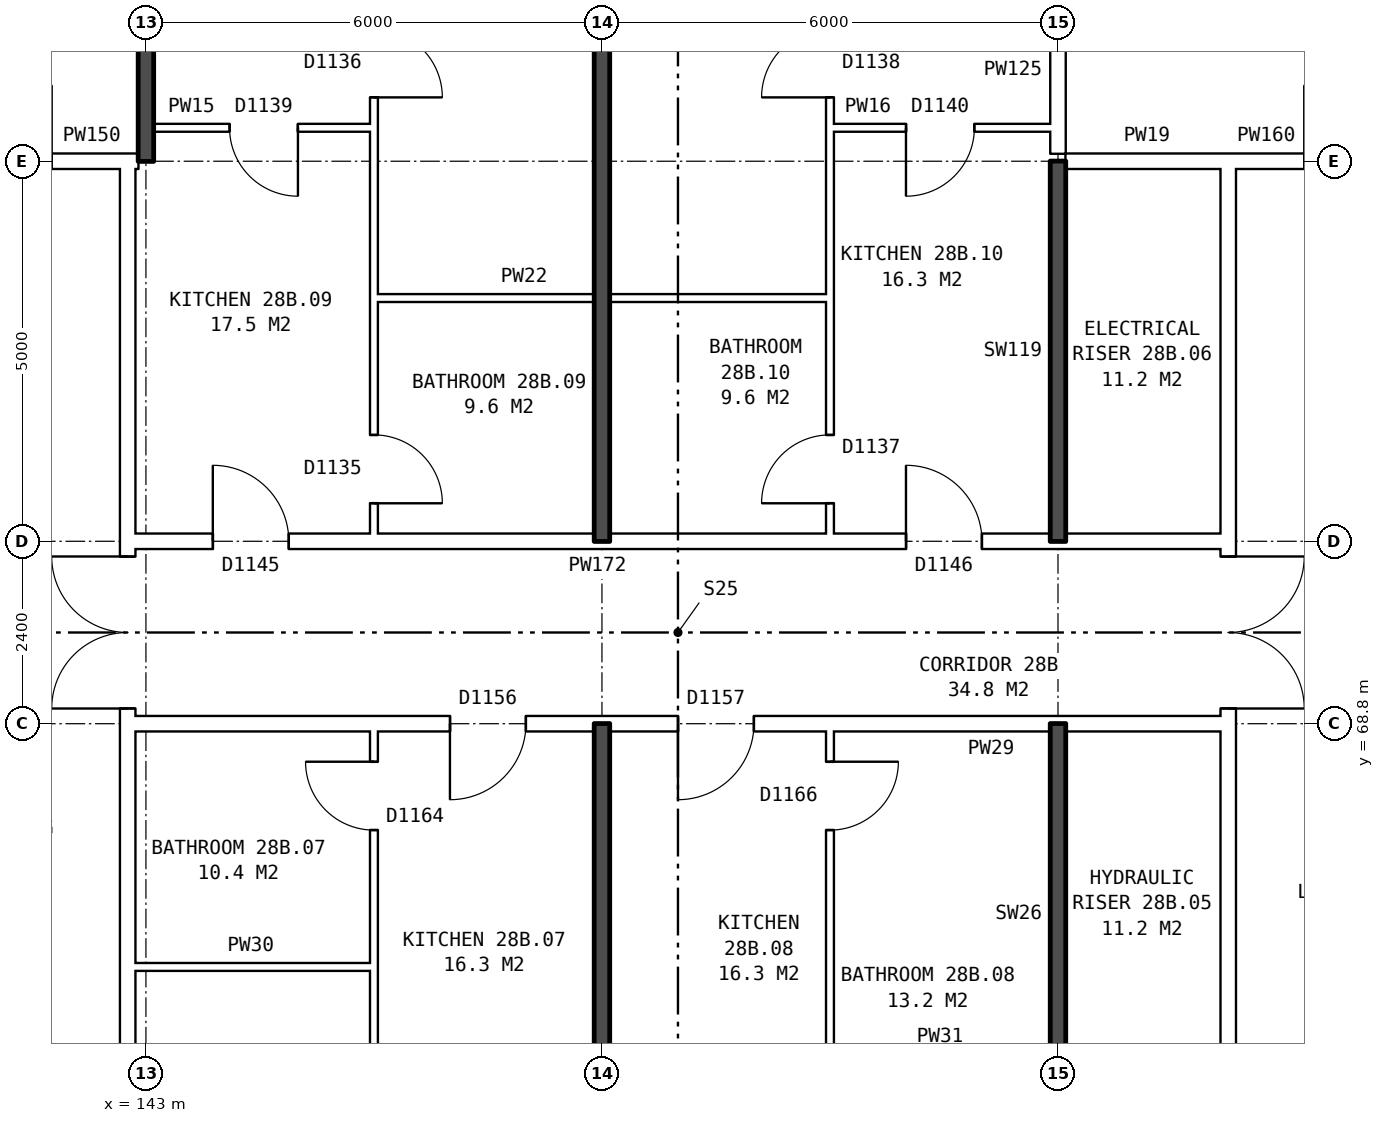
"""IFC4 building model, lengths in metres.
Left out: names, types, materials, properties, quantities, classifications, styles, units other than length and angle.
Written with IfcOpenShell. Run it as: python <this file> out.ifc"""

import sys

from ifc_helpers import new_model, si_unit, direction, frame, frame_2d, origin, place, context, subcontext, project, spatial, rectangle, extrude, element, fill, save


model = new_model("IFC4")
c1 = context("Model", 3, precision=1e-05, world=origin(), true_north=direction((0.0, 1.0)))
c2 = subcontext(c1, "Body", "Model", "MODEL_VIEW")
j1 = project(units=[si_unit("LENGTHUNIT", "METRE"), si_unit("PLANEANGLEUNIT", "RADIAN")], contexts=[c1])
p1 = place(None, origin())
s1 = spatial("IfcSite", under=j1, at=p1, CompositionType="ELEMENT")
p2 = place(p1, origin())
s2 = spatial("IfcBuilding", under=s1, at=p2, CompositionType="ELEMENT")
p3 = place(p2, frame((0.0, 0.0, 102.6)))
s3 = spatial("IfcBuildingStorey", under=s2, at=p3, CompositionType="ELEMENT", Elevation=102.6)
p4 = place(p3, frame((142.76, 63.9, 0.0), z_axis=(0.0, 0.0, 1.0), x_axis=(0.0, 1.0, 0.0)))
e1 = element("IfcWall", 1, at=p4, inside=s3, PredefinedType="PARTITIONING", context=c2, shape_type="SweptSolid", body=[
    extrude(rectangle(XDim=12.2, YDim=0.2, at=frame_2d((6.1, 0.0))), origin(), (0.0, 0.0, 1.0), 2.85),
])
p5 = place(p4, frame((5.1, 0.0, 0.0)))
e2 = element("IfcOpeningElement", 2, at=p5, cuts=e1, PredefinedType="OPENING", context=c2, shape_type="SweptSolid", body=[
    extrude(rectangle(XDim=2.0, YDim=2.1, at=frame_2d((1.0, 1.05))), frame((0.0, 0.11, 0.0), z_axis=(0.0, -1.0, 0.0), x_axis=(1.0, 0.0, 0.0)), (0.0, 0.0, 1.0), 0.22),
])
p6 = place(p3, frame((157.24, 63.9, 0.0), z_axis=(0.0, 0.0, 1.0), x_axis=(0.0, 1.0, 0.0)))
e3 = element("IfcWall", 3, at=p6, inside=s3, PredefinedType="PARTITIONING", context=c2, shape_type="SweptSolid", body=[
    extrude(rectangle(XDim=12.2, YDim=0.2, at=frame_2d((6.1, 0.0))), origin(), (0.0, 0.0, 1.0), 2.85),
])
p7 = place(p6, frame((5.1, 0.0, 0.0)))
e4 = element("IfcOpeningElement", 4, at=p7, cuts=e3, PredefinedType="OPENING", context=c2, shape_type="SweptSolid", body=[
    extrude(rectangle(XDim=2.0, YDim=2.1, at=frame_2d((1.0, 1.05))), frame((0.0, 0.11, 0.0), z_axis=(0.0, -1.0, 0.0), x_axis=(1.0, 0.0, 0.0)), (0.0, 0.0, 1.0), 0.22),
])
p8 = place(p3, frame((142.76, 65.6, 0.0), z_axis=(0.0, 0.0, 1.0), x_axis=(1.0, 0.0, 0.0)))
e5 = element("IfcWall", 5, at=p8, inside=s3, PredefinedType="PARTITIONING", context=c2, shape_type="SweptSolid", body=[
    extrude(rectangle(XDim=3.24, YDim=0.1, at=frame_2d((1.62, 0.0))), origin(), (0.0, 0.0, 1.0), 2.85),
])
p9 = place(p3, frame((142.76, 68.8, 0.0), z_axis=(0.0, 0.0, 1.0), x_axis=(1.0, 0.0, 0.0)))
e6 = element("IfcWall", 6, at=p9, inside=s3, PredefinedType="PARTITIONING", context=c2, shape_type="SweptSolid", body=[
    extrude(rectangle(XDim=14.48, YDim=0.2, at=frame_2d((7.24, 0.0))), origin(), (0.0, 0.0, 1.0), 2.85),
])
p10 = place(p9, frame((4.24, 0.0, 0.0)))
e7 = element("IfcOpeningElement", 7, at=p10, cuts=e6, PredefinedType="OPENING", context=c2, shape_type="SweptSolid", body=[
    extrude(rectangle(XDim=1.0, YDim=2.1, at=frame_2d((0.5, 1.05))), frame((0.0, 0.11, 0.0), z_axis=(0.0, -1.0, 0.0), x_axis=(1.0, 0.0, 0.0)), (0.0, 0.0, 1.0), 0.22),
])
p11 = place(p9, frame((7.24, 0.0, 0.0)))
e8 = element("IfcOpeningElement", 8, at=p11, cuts=e6, PredefinedType="OPENING", context=c2, shape_type="SweptSolid", body=[
    extrude(rectangle(XDim=1.0, YDim=2.1, at=frame_2d((0.5, 1.05))), frame((0.0, 0.11, 0.0), z_axis=(0.0, -1.0, 0.0), x_axis=(1.0, 0.0, 0.0)), (0.0, 0.0, 1.0), 0.22),
])
p12 = place(p3, frame((142.76, 71.2, 0.0), z_axis=(0.0, 0.0, 1.0), x_axis=(1.0, 0.0, 0.0)))
e9 = element("IfcWall", 9, at=p12, inside=s3, PredefinedType="PARTITIONING", context=c2, shape_type="SweptSolid", body=[
    extrude(rectangle(XDim=14.48, YDim=0.2, at=frame_2d((7.24, 0.0))), origin(), (0.0, 0.0, 1.0), 2.85),
])
p13 = place(p12, frame((1.12, 0.0, 0.0)))
e10 = element("IfcOpeningElement", 10, at=p13, cuts=e9, PredefinedType="OPENING", context=c2, shape_type="SweptSolid", body=[
    extrude(rectangle(XDim=1.0, YDim=2.1, at=frame_2d((0.5, 1.05))), frame((0.0, 0.11, 0.0), z_axis=(0.0, -1.0, 0.0), x_axis=(1.0, 0.0, 0.0)), (0.0, 0.0, 1.0), 0.22),
])
p14 = place(p12, frame((10.24, 0.0, 0.0)))
e11 = element("IfcOpeningElement", 11, at=p14, cuts=e9, PredefinedType="OPENING", context=c2, shape_type="SweptSolid", body=[
    extrude(rectangle(XDim=1.0, YDim=2.1, at=frame_2d((0.5, 1.05))), frame((0.0, 0.11, 0.0), z_axis=(0.0, -1.0, 0.0), x_axis=(1.0, 0.0, 0.0)), (0.0, 0.0, 1.0), 0.22),
])
p15 = place(p3, frame((146.0, 74.4, 0.0), z_axis=(0.0, 0.0, 1.0), x_axis=(1.0, 0.0, 0.0)))
e12 = element("IfcWall", 12, at=p15, inside=s3, PredefinedType="PARTITIONING", context=c2, shape_type="SweptSolid", body=[
    extrude(rectangle(XDim=6.0, YDim=0.1, at=frame_2d((3.0, 0.0))), origin(), (0.0, 0.0, 1.0), 2.85),
])
p16 = place(p3, frame((139.76, 76.2, 0.0), z_axis=(0.0, 0.0, 1.0), x_axis=(1.0, 0.0, 0.0)))
e13 = element("IfcWall", 13, at=p16, inside=s3, PredefinedType="PARTITIONING", context=c2, shape_type="SweptSolid", body=[
    extrude(rectangle(XDim=3.0, YDim=0.2, at=frame_2d((1.5, 0.0))), origin(), (0.0, 0.0, 1.0), 2.85),
])
p17 = place(p16, frame((1.0, 0.0, 0.0)))
e14 = element("IfcOpeningElement", 14, at=p17, cuts=e13, PredefinedType="OPENING", context=c2, shape_type="SweptSolid", body=[
    extrude(rectangle(XDim=1.0, YDim=2.1, at=frame_2d((0.5, 1.05))), frame((0.0, 0.11, 0.0), z_axis=(0.0, -1.0, 0.0), x_axis=(1.0, 0.0, 0.0)), (0.0, 0.0, 1.0), 0.22),
])
p18 = place(p3, frame((142.76, 76.2, 0.0), z_axis=(0.0, 0.0, 1.0), x_axis=(1.0, 0.0, 0.0)))
e15 = element("IfcWall", 15, at=p18, inside=s3, PredefinedType="PARTITIONING", context=c2, shape_type="SweptSolid", body=[
    extrude(rectangle(XDim=0.14, YDim=0.2, at=frame_2d((0.07, 0.0))), origin(), (0.0, 0.0, 1.0), 2.85),
])
p19 = place(p3, frame((155.1, 76.2, 0.0), z_axis=(0.0, 0.0, 1.0), x_axis=(1.0, 0.0, 0.0)))
e16 = element("IfcWall", 16, at=p19, inside=s3, PredefinedType="PARTITIONING", context=c2, shape_type="SweptSolid", body=[
    extrude(rectangle(XDim=2.14, YDim=0.2, at=frame_2d((1.07, 0.0))), origin(), (0.0, 0.0, 1.0), 2.85),
])
p20 = place(p3, frame((157.24, 76.2, 0.0), z_axis=(0.0, 0.0, 1.0), x_axis=(1.0, 0.0, 0.0)))
e17 = element("IfcWall", 17, at=p20, inside=s3, PredefinedType="PARTITIONING", context=c2, shape_type="SweptSolid", body=[
    extrude(rectangle(XDim=3.0, YDim=0.2, at=frame_2d((1.5, 0.0))), origin(), (0.0, 0.0, 1.0), 2.85),
])
p21 = place(p20, frame((1.0, 0.0, 0.0)))
e18 = element("IfcOpeningElement", 18, at=p21, cuts=e17, PredefinedType="OPENING", context=c2, shape_type="SweptSolid", body=[
    extrude(rectangle(XDim=1.0, YDim=2.1, at=frame_2d((0.5, 1.05))), frame((0.0, 0.11, 0.0), z_axis=(0.0, -1.0, 0.0), x_axis=(1.0, 0.0, 0.0)), (0.0, 0.0, 1.0), 0.22),
])
p22 = place(p3, frame((143.1, 76.64, 0.0), z_axis=(0.0, 0.0, 1.0), x_axis=(1.0, 0.0, 0.0)))
e19 = element("IfcWall", 19, at=p22, inside=s3, PredefinedType="PARTITIONING", context=c2, shape_type="SweptSolid", body=[
    extrude(rectangle(XDim=2.9, YDim=0.1, at=frame_2d((1.45, 0.0))), origin(), (0.0, 0.0, 1.0), 2.85),
])
p23 = place(p22, frame((1.0, 0.0, 0.0)))
e20 = element("IfcOpeningElement", 20, at=p23, cuts=e19, PredefinedType="OPENING", context=c2, shape_type="SweptSolid", body=[
    extrude(rectangle(XDim=0.9, YDim=2.1, at=frame_2d((0.45, 1.05))), frame((0.0, 0.06, 0.0), z_axis=(0.0, -1.0, 0.0), x_axis=(1.0, 0.0, 0.0)), (0.0, 0.0, 1.0), 0.12),
])
p24 = place(p3, frame((152.0, 76.64, 0.0), z_axis=(0.0, 0.0, 1.0), x_axis=(1.0, 0.0, 0.0)))
e21 = element("IfcWall", 21, at=p24, inside=s3, PredefinedType="PARTITIONING", context=c2, shape_type="SweptSolid", body=[
    extrude(rectangle(XDim=2.9, YDim=0.1, at=frame_2d((1.45, 0.0))), origin(), (0.0, 0.0, 1.0), 2.85),
])
p25 = place(p24, frame((1.0, 0.0, 0.0)))
e22 = element("IfcOpeningElement", 22, at=p25, cuts=e21, PredefinedType="OPENING", context=c2, shape_type="SweptSolid", body=[
    extrude(rectangle(XDim=0.9, YDim=2.1, at=frame_2d((0.45, 1.05))), frame((0.0, 0.06, 0.0), z_axis=(0.0, -1.0, 0.0), x_axis=(1.0, 0.0, 0.0)), (0.0, 0.0, 1.0), 0.12),
])
p26 = place(p3, frame((143.0, 76.2, 0.0), z_axis=(0.0, 0.0, 1.0), x_axis=(0.0, 1.0, 0.0)))
e23 = element("IfcWall", 23, at=p26, inside=s3, PredefinedType="SOLIDWALL", context=c2, shape_type="SweptSolid", body=[
    extrude(rectangle(XDim=9.44, YDim=0.2, at=frame_2d((4.72, 0.0))), origin(), (0.0, 0.0, 1.0), 2.85),
])
p27 = place(p3, frame((146.0, 54.36, 0.0), z_axis=(0.0, 0.0, 1.0), x_axis=(0.0, 1.0, 0.0)))
e24 = element("IfcWall", 24, at=p27, inside=s3, PredefinedType="PARTITIONING", context=c2, shape_type="SweptSolid", body=[
    extrude(rectangle(XDim=14.34, YDim=0.1, at=frame_2d((7.17, 0.0))), origin(), (0.0, 0.0, 1.0), 2.85),
])
p28 = place(p27, frame((7.7, 0.0, 0.0)))
e25 = element("IfcOpeningElement", 25, at=p28, cuts=e24, PredefinedType="OPENING", context=c2, shape_type="SweptSolid", body=[
    extrude(rectangle(XDim=0.9, YDim=2.1, at=frame_2d((0.45, 1.05))), frame((0.0, 0.06, 0.0), z_axis=(0.0, -1.0, 0.0), x_axis=(1.0, 0.0, 0.0)), (0.0, 0.0, 1.0), 0.12),
])
p29 = place(p27, frame((13.04, 0.0, 0.0)))
e26 = element("IfcOpeningElement", 26, at=p29, cuts=e24, PredefinedType="OPENING", context=c2, shape_type="SweptSolid", body=[
    extrude(rectangle(XDim=0.9, YDim=2.1, at=frame_2d((0.45, 1.05))), frame((0.0, 0.06, 0.0), z_axis=(0.0, -1.0, 0.0), x_axis=(1.0, 0.0, 0.0)), (0.0, 0.0, 1.0), 0.12),
])
p30 = place(p3, frame((146.0, 71.3, 0.0), z_axis=(0.0, 0.0, 1.0), x_axis=(0.0, 1.0, 0.0)))
e27 = element("IfcWall", 27, at=p30, inside=s3, PredefinedType="PARTITIONING", context=c2, shape_type="SweptSolid", body=[
    extrude(rectangle(XDim=14.34, YDim=0.1, at=frame_2d((7.17, 0.0))), origin(), (0.0, 0.0, 1.0), 2.85),
])
p31 = place(p30, frame((5.74, 0.0, 0.0)))
e28 = element("IfcOpeningElement", 28, at=p31, cuts=e27, PredefinedType="OPENING", context=c2, shape_type="SweptSolid", body=[
    extrude(rectangle(XDim=0.9, YDim=2.1, at=frame_2d((0.45, 1.05))), frame((0.0, 0.06, 0.0), z_axis=(0.0, -1.0, 0.0), x_axis=(1.0, 0.0, 0.0)), (0.0, 0.0, 1.0), 0.12),
])
p32 = place(p30, frame((0.4, 0.0, 0.0)))
e29 = element("IfcOpeningElement", 29, at=p32, cuts=e27, PredefinedType="OPENING", context=c2, shape_type="SweptSolid", body=[
    extrude(rectangle(XDim=0.9, YDim=2.1, at=frame_2d((0.45, 1.05))), frame((0.0, 0.06, 0.0), z_axis=(0.0, -1.0, 0.0), x_axis=(1.0, 0.0, 0.0)), (0.0, 0.0, 1.0), 0.12),
])
for number, where, z_axis, x_axis in (
    (30, (149.0, 54.36, 0.0), (0.0, 0.0, 1.0), (0.0, 1.0, 0.0)),
    (31, (149.0, 71.2, 0.0), (0.0, 0.0, 1.0), (0.0, 1.0, 0.0)),
):
    element("IfcWall", number, at=place(p3, frame(where, z_axis=z_axis, x_axis=x_axis)), inside=s3, PredefinedType="SOLIDWALL", context=c2, shape_type="SweptSolid", body=[
        extrude(rectangle(XDim=14.44, YDim=0.2, at=frame_2d((7.22, 0.0))), origin(), (0.0, 0.0, 1.0), 2.85),
    ])
p33 = place(p3, frame((152.0, 54.36, 0.0), z_axis=(0.0, 0.0, 1.0), x_axis=(0.0, 1.0, 0.0)))
e32 = element("IfcWall", 32, at=p33, inside=s3, PredefinedType="PARTITIONING", context=c2, shape_type="SweptSolid", body=[
    extrude(rectangle(XDim=14.34, YDim=0.1, at=frame_2d((7.17, 0.0))), origin(), (0.0, 0.0, 1.0), 2.85),
])
p34 = place(p33, frame((7.7, 0.0, 0.0)))
e33 = element("IfcOpeningElement", 33, at=p34, cuts=e32, PredefinedType="OPENING", context=c2, shape_type="SweptSolid", body=[
    extrude(rectangle(XDim=0.9, YDim=2.1, at=frame_2d((0.45, 1.05))), frame((0.0, 0.06, 0.0), z_axis=(0.0, -1.0, 0.0), x_axis=(1.0, 0.0, 0.0)), (0.0, 0.0, 1.0), 0.12),
])
p35 = place(p33, frame((13.04, 0.0, 0.0)))
e34 = element("IfcOpeningElement", 34, at=p35, cuts=e32, PredefinedType="OPENING", context=c2, shape_type="SweptSolid", body=[
    extrude(rectangle(XDim=0.9, YDim=2.1, at=frame_2d((0.45, 1.05))), frame((0.0, 0.06, 0.0), z_axis=(0.0, -1.0, 0.0), x_axis=(1.0, 0.0, 0.0)), (0.0, 0.0, 1.0), 0.12),
])
p36 = place(p3, frame((152.0, 71.3, 0.0), z_axis=(0.0, 0.0, 1.0), x_axis=(0.0, 1.0, 0.0)))
e35 = element("IfcWall", 35, at=p36, inside=s3, PredefinedType="PARTITIONING", context=c2, shape_type="SweptSolid", body=[
    extrude(rectangle(XDim=14.34, YDim=0.1, at=frame_2d((7.17, 0.0))), origin(), (0.0, 0.0, 1.0), 2.85),
])
p37 = place(p36, frame((5.74, 0.0, 0.0)))
e36 = element("IfcOpeningElement", 36, at=p37, cuts=e35, PredefinedType="OPENING", context=c2, shape_type="SweptSolid", body=[
    extrude(rectangle(XDim=0.9, YDim=2.1, at=frame_2d((0.45, 1.05))), frame((0.0, 0.06, 0.0), z_axis=(0.0, -1.0, 0.0), x_axis=(1.0, 0.0, 0.0)), (0.0, 0.0, 1.0), 0.12),
])
p38 = place(p36, frame((0.4, 0.0, 0.0)))
e37 = element("IfcOpeningElement", 37, at=p38, cuts=e35, PredefinedType="OPENING", context=c2, shape_type="SweptSolid", body=[
    extrude(rectangle(XDim=0.9, YDim=2.1, at=frame_2d((0.45, 1.05))), frame((0.0, 0.06, 0.0), z_axis=(0.0, -1.0, 0.0), x_axis=(1.0, 0.0, 0.0)), (0.0, 0.0, 1.0), 0.12),
])
for number, where, z_axis, x_axis in (
    (38, (155.0, 63.8, 0.0), (0.0, 0.0, 1.0), (0.0, 1.0, 0.0)),
    (39, (155.0, 71.2, 0.0), (0.0, 0.0, 1.0), (0.0, 1.0, 0.0)),
):
    element("IfcWall", number, at=place(p3, frame(where, z_axis=z_axis, x_axis=x_axis)), inside=s3, PredefinedType="SOLIDWALL", context=c2, shape_type="SweptSolid", body=[
        extrude(rectangle(XDim=5.0, YDim=0.2, at=frame_2d((2.5, 0.0))), origin(), (0.0, 0.0, 1.0), 2.85),
    ])
p39 = place(p3, frame((155.0, 76.3, 0.0), z_axis=(0.0, 0.0, 1.0), x_axis=(0.0, 1.0, 0.0)))
e40 = element("IfcWall", 40, at=p39, inside=s3, PredefinedType="PARTITIONING", context=c2, shape_type="SweptSolid", body=[
    extrude(rectangle(XDim=2.2, YDim=0.2, at=frame_2d((1.1, 0.0))), origin(), (0.0, 0.0, 1.0), 2.85),
])
p40 = place(p5, origin())
e41 = element("IfcDoor", 41, at=p40, inside=s3, OperationType="DOUBLE_DOOR_SINGLE_SWING", PredefinedType="DOOR", context=c2, shape_type="SweptSolid", body=[
    extrude(rectangle(XDim=2.0, YDim=2.1, at=frame_2d((1.0, 1.05))), frame((0.0, 0.025, 0.0), z_axis=(0.0, -1.0, 0.0), x_axis=(1.0, 0.0, 0.0)), (0.0, 0.0, 1.0), 0.05),
])
fill(e2, e41)
p41 = place(p7, frame((2.0, 0.0, 0.0), z_axis=(0.0, 0.0, 1.0), x_axis=(-1.0, 0.0, 0.0)))
e42 = element("IfcDoor", 42, at=p41, inside=s3, OperationType="DOUBLE_DOOR_SINGLE_SWING", PredefinedType="DOOR", context=c2, shape_type="SweptSolid", body=[
    extrude(rectangle(XDim=2.0, YDim=2.1, at=frame_2d((1.0, 1.05))), frame((0.0, 0.025, 0.0), z_axis=(0.0, -1.0, 0.0), x_axis=(1.0, 0.0, 0.0)), (0.0, 0.0, 1.0), 0.05),
])
fill(e4, e42)
p42 = place(p10, frame((1.0, 0.0, 0.0), z_axis=(0.0, 0.0, 1.0), x_axis=(-1.0, 0.0, 0.0)))
e43 = element("IfcDoor", 43, at=p42, inside=s3, OperationType="SINGLE_SWING_RIGHT", PredefinedType="DOOR", context=c2, shape_type="SweptSolid", body=[
    extrude(rectangle(XDim=1.0, YDim=2.1, at=frame_2d((0.5, 1.05))), frame((0.0, 0.025, 0.0), z_axis=(0.0, -1.0, 0.0), x_axis=(1.0, 0.0, 0.0)), (0.0, 0.0, 1.0), 0.05),
])
fill(e7, e43)
p43 = place(p29, origin())
e44 = element("IfcDoor", 44, at=p43, inside=s3, OperationType="SINGLE_SWING_RIGHT", PredefinedType="DOOR", context=c2, shape_type="SweptSolid", body=[
    extrude(rectangle(XDim=0.9, YDim=2.1, at=frame_2d((0.45, 1.05))), frame((0.0, 0.025, 0.0), z_axis=(0.0, -1.0, 0.0), x_axis=(1.0, 0.0, 0.0)), (0.0, 0.0, 1.0), 0.05),
])
fill(e26, e44)
p44 = place(p11, frame((1.0, 0.0, 0.0), z_axis=(0.0, 0.0, 1.0), x_axis=(-1.0, 0.0, 0.0)))
e45 = element("IfcDoor", 45, at=p44, inside=s3, OperationType="SINGLE_SWING_RIGHT", PredefinedType="DOOR", context=c2, shape_type="SweptSolid", body=[
    extrude(rectangle(XDim=1.0, YDim=2.1, at=frame_2d((0.5, 1.05))), frame((0.0, 0.025, 0.0), z_axis=(0.0, -1.0, 0.0), x_axis=(1.0, 0.0, 0.0)), (0.0, 0.0, 1.0), 0.05),
])
fill(e8, e45)
p45 = place(p35, frame((0.9, 0.0, 0.0), z_axis=(0.0, 0.0, 1.0), x_axis=(-1.0, 0.0, 0.0)))
e46 = element("IfcDoor", 46, at=p45, inside=s3, OperationType="SINGLE_SWING_LEFT", PredefinedType="DOOR", context=c2, shape_type="SweptSolid", body=[
    extrude(rectangle(XDim=0.9, YDim=2.1, at=frame_2d((0.45, 1.05))), frame((0.0, 0.025, 0.0), z_axis=(0.0, -1.0, 0.0), x_axis=(1.0, 0.0, 0.0)), (0.0, 0.0, 1.0), 0.05),
])
fill(e34, e46)
p46 = place(p31, frame((0.9, 0.0, 0.0), z_axis=(0.0, 0.0, 1.0), x_axis=(-1.0, 0.0, 0.0)))
e47 = element("IfcDoor", 47, at=p46, inside=s3, OperationType="SINGLE_SWING_RIGHT", PredefinedType="DOOR", context=c2, shape_type="SweptSolid", body=[
    extrude(rectangle(XDim=0.9, YDim=2.1, at=frame_2d((0.45, 1.05))), frame((0.0, 0.025, 0.0), z_axis=(0.0, -1.0, 0.0), x_axis=(1.0, 0.0, 0.0)), (0.0, 0.0, 1.0), 0.05),
])
fill(e28, e47)
p47 = place(p13, origin())
e48 = element("IfcDoor", 48, at=p47, inside=s3, OperationType="SINGLE_SWING_LEFT", PredefinedType="DOOR", context=c2, shape_type="SweptSolid", body=[
    extrude(rectangle(XDim=1.0, YDim=2.1, at=frame_2d((0.5, 1.05))), frame((0.0, 0.025, 0.0), z_axis=(0.0, -1.0, 0.0), x_axis=(1.0, 0.0, 0.0)), (0.0, 0.0, 1.0), 0.05),
])
fill(e10, e48)
p48 = place(p23, frame((0.9, 0.0, 0.0), z_axis=(0.0, 0.0, 1.0), x_axis=(-1.0, 0.0, 0.0)))
e49 = element("IfcDoor", 49, at=p48, inside=s3, OperationType="SINGLE_SWING_LEFT", PredefinedType="DOOR", context=c2, shape_type="SweptSolid", body=[
    extrude(rectangle(XDim=0.9, YDim=2.1, at=frame_2d((0.45, 1.05))), frame((0.0, 0.025, 0.0), z_axis=(0.0, -1.0, 0.0), x_axis=(1.0, 0.0, 0.0)), (0.0, 0.0, 1.0), 0.05),
])
fill(e20, e49)
p49 = place(p32, frame((0.9, 0.0, 0.0), z_axis=(0.0, 0.0, 1.0), x_axis=(-1.0, 0.0, 0.0)))
e50 = element("IfcDoor", 50, at=p49, inside=s3, OperationType="SINGLE_SWING_RIGHT", PredefinedType="DOOR", context=c2, shape_type="SweptSolid", body=[
    extrude(rectangle(XDim=0.9, YDim=2.1, at=frame_2d((0.45, 1.05))), frame((0.0, 0.025, 0.0), z_axis=(0.0, -1.0, 0.0), x_axis=(1.0, 0.0, 0.0)), (0.0, 0.0, 1.0), 0.05),
])
fill(e29, e50)
p50 = place(p37, origin())
e51 = element("IfcDoor", 51, at=p50, inside=s3, OperationType="SINGLE_SWING_LEFT", PredefinedType="DOOR", context=c2, shape_type="SweptSolid", body=[
    extrude(rectangle(XDim=0.9, YDim=2.1, at=frame_2d((0.45, 1.05))), frame((0.0, 0.025, 0.0), z_axis=(0.0, -1.0, 0.0), x_axis=(1.0, 0.0, 0.0)), (0.0, 0.0, 1.0), 0.05),
])
fill(e36, e51)
p51 = place(p14, origin())
e52 = element("IfcDoor", 52, at=p51, inside=s3, OperationType="SINGLE_SWING_LEFT", PredefinedType="DOOR", context=c2, shape_type="SweptSolid", body=[
    extrude(rectangle(XDim=1.0, YDim=2.1, at=frame_2d((0.5, 1.05))), frame((0.0, 0.025, 0.0), z_axis=(0.0, -1.0, 0.0), x_axis=(1.0, 0.0, 0.0)), (0.0, 0.0, 1.0), 0.05),
])
fill(e11, e52)
p52 = place(p25, frame((0.9, 0.0, 0.0), z_axis=(0.0, 0.0, 1.0), x_axis=(-1.0, 0.0, 0.0)))
e53 = element("IfcDoor", 53, at=p52, inside=s3, OperationType="SINGLE_SWING_RIGHT", PredefinedType="DOOR", context=c2, shape_type="SweptSolid", body=[
    extrude(rectangle(XDim=0.9, YDim=2.1, at=frame_2d((0.45, 1.05))), frame((0.0, 0.025, 0.0), z_axis=(0.0, -1.0, 0.0), x_axis=(1.0, 0.0, 0.0)), (0.0, 0.0, 1.0), 0.05),
])
fill(e22, e53)
p53 = place(p38, origin())
e54 = element("IfcDoor", 54, at=p53, inside=s3, OperationType="SINGLE_SWING_LEFT", PredefinedType="DOOR", context=c2, shape_type="SweptSolid", body=[
    extrude(rectangle(XDim=0.9, YDim=2.1, at=frame_2d((0.45, 1.05))), frame((0.0, 0.025, 0.0), z_axis=(0.0, -1.0, 0.0), x_axis=(1.0, 0.0, 0.0)), (0.0, 0.0, 1.0), 0.05),
])
fill(e37, e54)
save(model, sys.argv[1])
